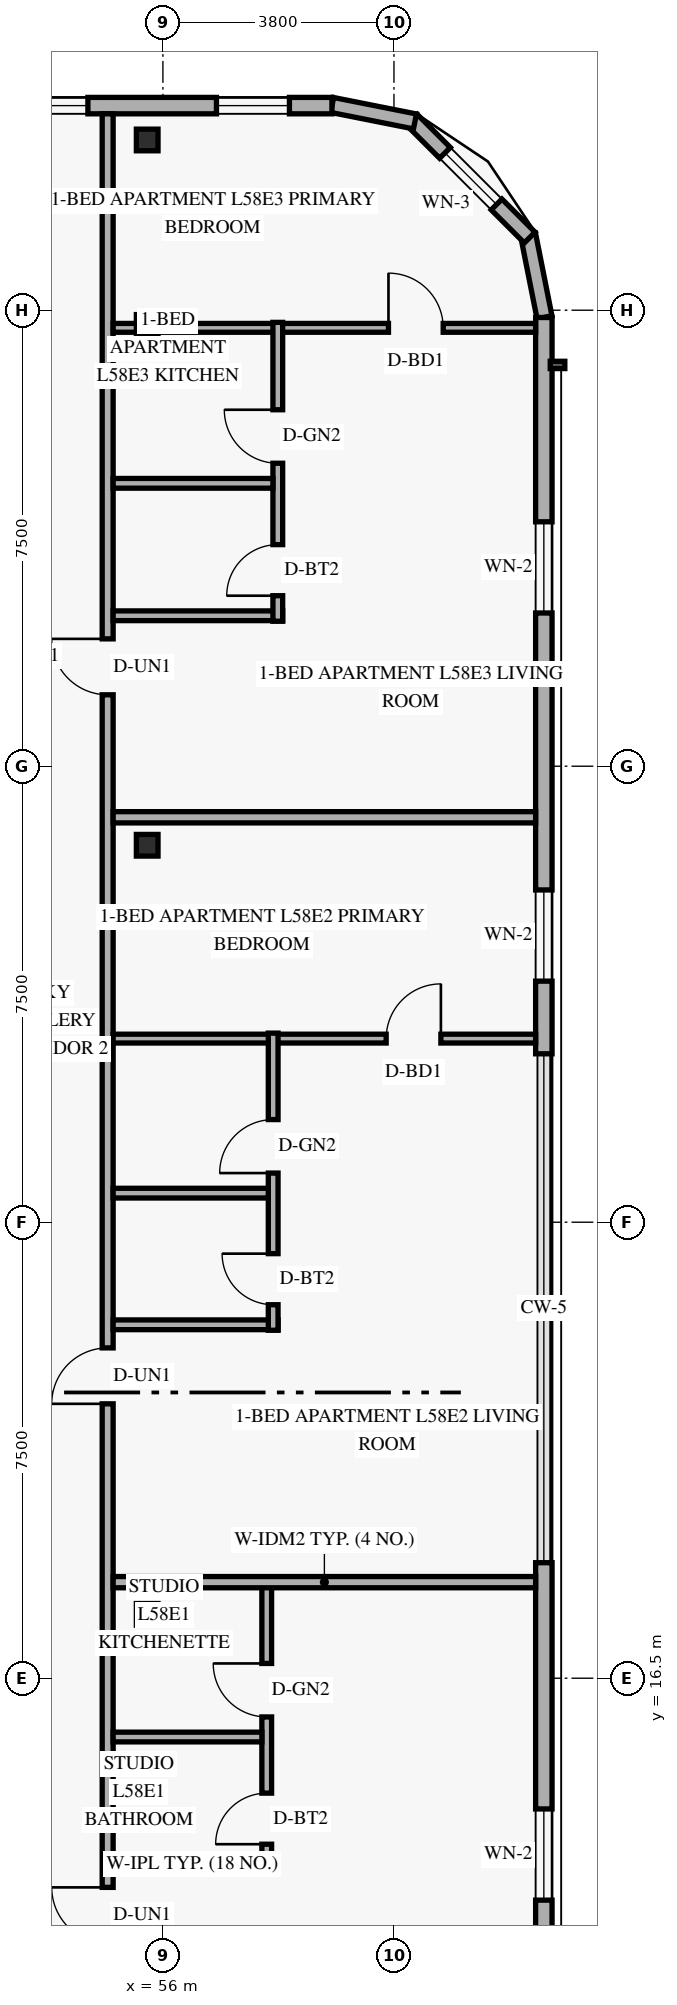
"""IFC4 building model, lengths in metres.
Left out: names, types, materials, properties, quantities, classifications, styles, units other than length and angle.
Written with IfcOpenShell. Run it as: python <this file> out.ifc"""

import sys

from ifc_helpers import new_model, si_unit, direction, frame, frame_2d, origin, origin_2d, place, context, subcontext, project, spatial, rectangle, hollow_rectangle, extrude, element, fill, save


model = new_model("IFC4")
c1 = context("Model", 3, precision=1e-05, world=origin(), true_north=direction((0.0, 1.0)))
c2 = subcontext(c1, "Body", "Model", "MODEL_VIEW")
j1 = project(units=[si_unit("LENGTHUNIT", "METRE"), si_unit("PLANEANGLEUNIT", "RADIAN")], contexts=[c1])
p1 = place(None, origin())
s1 = spatial("IfcSite", under=j1, at=p1, CompositionType="ELEMENT")
p2 = place(p1, origin())
s2 = spatial("IfcBuilding", under=s1, at=p2, CompositionType="ELEMENT")
p3 = place(p2, frame((0.0, 0.0, 223.8)))
s3 = spatial("IfcBuildingStorey", under=s2, at=p3, CompositionType="ELEMENT", Elevation=223.8)
for number, where, z_axis, x_axis in (
    (1, (55.637, 17.55, 0.0), (0.058, 0.0, 0.998), (0.0, 1.0, 0.0)),
    (2, (55.637, 30.2, 0.0), (0.058, 0.0, 0.998), (0.0, 1.0, 0.0)),
    (3, (55.637, 38.75, 0.0), (0.058, 0.0, 0.998), (0.0, 1.0, 0.0)),
    (4, (55.637, 41.8, 0.0), (0.058, 0.0, 0.998), (0.0, 1.0, 0.0)),
):
    element("IfcColumn", number, at=place(p3, frame(where, z_axis=z_axis, x_axis=x_axis)), inside=s3, PredefinedType="COLUMN", context=c2, shape_type="SweptSolid", body=[
        extrude(hollow_rectangle(XDim=0.356, YDim=0.356, WallThickness=0.016, at=origin_2d()), origin(), (0.0, 0.0, 1.0), 3.606),
    ])
p4 = place(p3, frame((62.276, 38.884, 0.0), z_axis=(0.0, 0.0, 1.0), x_axis=(-0.195135625965, 0.9807762678, 0.0)))
e5 = element("IfcWall", 5, at=p4, inside=s3, PredefinedType="SOLIDWALL", context=c2, shape_type="SweptSolid", body=[
    extrude(rectangle(XDim=1.389, YDim=0.25, at=frame_2d((0.694, 0.0))), origin(), (0.0, 0.0, 1.0), 3.36),
])
p5 = place(p3, frame((62.032, 40.195, 0.0), z_axis=(0.0, 0.0, 1.0), x_axis=(-0.707106781187, 0.707106781187, 0.0)))
e6 = element("IfcWall", 6, at=p5, inside=s3, PredefinedType="SOLIDWALL", context=c2, shape_type="SweptSolid", body=[
    extrude(rectangle(XDim=2.739, YDim=0.25, at=frame_2d((1.37, 0.0))), origin(), (0.0, 0.0, 1.0), 3.36),
])
p6 = place(p5, frame((0.77, 0.0, 0.85)))
e7 = element("IfcOpeningElement", 7, at=p6, cuts=e6, PredefinedType="OPENING", context=c2, shape_type="SweptSolid", body=[
    extrude(rectangle(XDim=1.2, YDim=1.5, at=frame_2d((0.6, 0.75))), frame((0.0, 0.135, 0.0), z_axis=(0.0, -1.0, 0.0), x_axis=(1.0, 0.0, 0.0)), (0.0, 0.0, 1.0), 0.27),
])
p7 = place(p3, frame((60.146, 42.105, 0.0), z_axis=(0.0, 0.0, 1.0), x_axis=(-0.980809899341, 0.19496651342, 0.0)))
e8 = element("IfcWall", 8, at=p7, inside=s3, PredefinedType="SOLIDWALL", context=c2, shape_type="SweptSolid", body=[
    extrude(rectangle(XDim=1.389, YDim=0.25, at=frame_2d((0.694, 0.0))), origin(), (0.0, 0.0, 1.0), 3.36),
])
p8 = place(p3, frame((62.265, 9.12, 0.0), z_axis=(0.0, 0.0, 1.0), x_axis=(0.0, 1.0, 0.0)))
e9 = element("IfcWall", 9, at=p8, inside=s3, PredefinedType="SOLIDWALL", context=c2, shape_type="SweptSolid", body=[
    extrude(rectangle(XDim=9.28, YDim=0.27, at=frame_2d((4.64, 0.0))), origin(), (0.0, 0.0, 1.0), 3.36),
])
p9 = place(p8, frame((3.73, 0.0, 0.85)))
e10 = element("IfcOpeningElement", 10, at=p9, cuts=e9, PredefinedType="OPENING", context=c2, shape_type="SweptSolid", body=[
    extrude(rectangle(XDim=1.5, YDim=1.55, at=frame_2d((0.75, 0.775))), frame((0.0, 0.145, 0.0), z_axis=(0.0, -1.0, 0.0), x_axis=(1.0, 0.0, 0.0)), (0.0, 0.0, 1.0), 0.29),
])
p10 = place(p3, frame((62.265, 26.77, 0.0), z_axis=(0.0, 0.0, 1.0), x_axis=(0.0, 1.0, 0.0)))
e11 = element("IfcWall", 11, at=p10, inside=s3, PredefinedType="SOLIDWALL", context=c2, shape_type="SweptSolid", body=[
    extrude(rectangle(XDim=12.11, YDim=0.27, at=frame_2d((6.055, 0.0))), origin(), (0.0, 0.0, 1.0), 3.36),
])
p11 = place(p10, frame((1.195, 0.0, 0.85)))
e12 = element("IfcOpeningElement", 12, at=p11, cuts=e11, PredefinedType="OPENING", context=c2, shape_type="SweptSolid", body=[
    extrude(rectangle(XDim=1.5, YDim=1.55, at=frame_2d((0.75, 0.775))), frame((0.0, 0.145, 0.0), z_axis=(0.0, -1.0, 0.0), x_axis=(1.0, 0.0, 0.0)), (0.0, 0.0, 1.0), 0.29),
])
p12 = place(p10, frame((7.25, 0.0, 0.85)))
e13 = element("IfcOpeningElement", 13, at=p12, cuts=e11, PredefinedType="OPENING", context=c2, shape_type="SweptSolid", body=[
    extrude(rectangle(XDim=1.5, YDim=1.55, at=frame_2d((0.75, 0.775))), frame((0.0, 0.145, 0.0), z_axis=(0.0, -1.0, 0.0), x_axis=(1.0, 0.0, 0.0)), (0.0, 0.0, 1.0), 0.29),
])
p13 = place(p3, frame((58.78, 42.365, 0.0), z_axis=(0.0, 0.0, 1.0), x_axis=(-1.0, 0.0, 0.0)))
e14 = element("IfcWall", 14, at=p13, inside=s3, PredefinedType="SOLIDWALL", context=c2, shape_type="SweptSolid", body=[
    extrude(rectangle(XDim=32.96, YDim=0.27, at=frame_2d((16.48, 0.0))), origin(), (0.0, 0.0, 1.0), 3.36),
])
p14 = place(p13, frame((27.89, 0.0, 0.85)))
e15 = element("IfcOpeningElement", 15, at=p14, cuts=e14, PredefinedType="OPENING", context=c2, shape_type="SweptSolid", body=[
    extrude(rectangle(XDim=1.2, YDim=1.5, at=frame_2d((0.6, 0.75))), frame((0.0, 0.145, 0.0), z_axis=(0.0, -1.0, 0.0), x_axis=(1.0, 0.0, 0.0)), (0.0, 0.0, 1.0), 0.29),
])
p15 = place(p13, frame((15.034, 0.0, 0.85)))
e16 = element("IfcOpeningElement", 16, at=p15, cuts=e14, PredefinedType="OPENING", context=c2, shape_type="SweptSolid", body=[
    extrude(rectangle(XDim=1.2, YDim=1.5, at=frame_2d((0.6, 0.75))), frame((0.0, 0.145, 0.0), z_axis=(0.0, -1.0, 0.0), x_axis=(1.0, 0.0, 0.0)), (0.0, 0.0, 1.0), 0.29),
])
p16 = place(p13, frame((4.013, 0.0, 0.85)))
e17 = element("IfcOpeningElement", 17, at=p16, cuts=e14, PredefinedType="OPENING", context=c2, shape_type="SweptSolid", body=[
    extrude(rectangle(XDim=1.2, YDim=1.5, at=frame_2d((0.6, 0.75))), frame((0.0, 0.145, 0.0), z_axis=(0.0, -1.0, 0.0), x_axis=(1.0, 0.0, 0.0)), (0.0, 0.0, 1.0), 0.29),
])
p17 = place(p13, frame((0.699, 0.0, 0.85)))
e18 = element("IfcOpeningElement", 18, at=p17, cuts=e14, PredefinedType="OPENING", context=c2, shape_type="SweptSolid", body=[
    extrude(rectangle(XDim=1.2, YDim=1.5, at=frame_2d((0.6, 0.75))), frame((0.0, 0.145, 0.0), z_axis=(0.0, -1.0, 0.0), x_axis=(1.0, 0.0, 0.0)), (0.0, 0.0, 1.0), 0.29),
])
p18 = place(p3, frame((55.092, 5.77, 0.0), z_axis=(0.0, 0.0, 1.0), x_axis=(0.0, 1.0, 0.0)))
e19 = element("IfcWall", 19, at=p18, inside=s3, PredefinedType="STANDARD", context=c2, shape_type="SweptSolid", body=[
    extrude(rectangle(XDim=36.46, YDim=0.18, at=frame_2d((18.23, 0.0))), origin(), (0.0, 0.0, 1.0), 2.803),
])
p19 = place(p18, frame((6.37, 0.0, 0.0)))
e20 = element("IfcOpeningElement", 20, at=p19, cuts=e19, PredefinedType="OPENING", context=c2, shape_type="SweptSolid", body=[
    extrude(rectangle(XDim=0.92, YDim=2.15, at=frame_2d((0.46, 1.075))), frame((0.0, 0.1, 0.0), z_axis=(0.0, -1.0, 0.0), x_axis=(1.0, 0.0, 0.0)), (0.0, 0.0, 1.0), 0.2),
])
p20 = place(p18, frame((15.243, 0.0, 0.0)))
e21 = element("IfcOpeningElement", 21, at=p20, cuts=e19, PredefinedType="OPENING", context=c2, shape_type="SweptSolid", body=[
    extrude(rectangle(XDim=0.92, YDim=2.15, at=frame_2d((0.46, 1.075))), frame((0.0, 0.1, 0.0), z_axis=(0.0, -1.0, 0.0), x_axis=(1.0, 0.0, 0.0)), (0.0, 0.0, 1.0), 0.2),
])
p21 = place(p18, frame((26.905, 0.0, 0.0)))
e22 = element("IfcOpeningElement", 22, at=p21, cuts=e19, PredefinedType="OPENING", context=c2, shape_type="SweptSolid", body=[
    extrude(rectangle(XDim=0.92, YDim=2.15, at=frame_2d((0.46, 1.075))), frame((0.0, 0.1, 0.0), z_axis=(0.0, -1.0, 0.0), x_axis=(1.0, 0.0, 0.0)), (0.0, 0.0, 1.0), 0.2),
])
p22 = place(p3, frame((55.182, 13.44, 0.0), z_axis=(0.0, 0.0, 1.0), x_axis=(1.0, 0.0, 0.0)))
e23 = element("IfcWall", 23, at=p22, inside=s3, PredefinedType="PLUMBINGWALL", context=c2, shape_type="SweptSolid", body=[
    extrude(rectangle(XDim=2.606, YDim=0.16, at=frame_2d((1.303, 0.0))), origin(), (0.0, 0.0, 1.0), 2.803),
])
p23 = place(p3, frame((57.708, 13.35, 0.0), z_axis=(0.0, 0.0, 1.0), x_axis=(0.0, 1.0, 0.0)))
e24 = element("IfcWall", 24, at=p23, inside=s3, PredefinedType="PLUMBINGWALL", context=c2, shape_type="SweptSolid", body=[
    extrude(rectangle(XDim=4.73, YDim=0.16, at=frame_2d((2.365, 0.0))), origin(), (0.0, 0.0, 1.0), 3.36),
])
p24 = place(p23, frame((0.42, 0.0, 0.0)))
e25 = element("IfcOpeningElement", 25, at=p24, cuts=e24, PredefinedType="OPENING", context=c2, shape_type="SweptSolid", body=[
    extrude(rectangle(XDim=0.84, YDim=2.12, at=frame_2d((0.42, 1.06))), frame((0.0, 0.09, 0.0), z_axis=(0.0, -1.0, 0.0), x_axis=(1.0, 0.0, 0.0)), (0.0, 0.0, 1.0), 0.18),
])
p25 = place(p23, frame((2.513, 0.0, 0.0)))
e26 = element("IfcOpeningElement", 26, at=p25, cuts=e24, PredefinedType="OPENING", context=c2, shape_type="SweptSolid", body=[
    extrude(rectangle(XDim=0.88, YDim=2.12, at=frame_2d((0.44, 1.06))), frame((0.0, 0.09, 0.0), z_axis=(0.0, -1.0, 0.0), x_axis=(1.0, 0.0, 0.0)), (0.0, 0.0, 1.0), 0.18),
])
p26 = place(p3, frame((55.182, 15.533, 0.0), z_axis=(0.0, 0.0, 1.0), x_axis=(1.0, 0.0, 0.0)))
e27 = element("IfcWall", 27, at=p26, inside=s3, PredefinedType="PLUMBINGWALL", context=c2, shape_type="SweptSolid", body=[
    extrude(rectangle(XDim=2.446, YDim=0.16, at=frame_2d((1.223, 0.0))), origin(), (0.0, 0.0, 1.0), 2.803),
])
p27 = place(p3, frame((55.182, 18.08, 0.0), z_axis=(0.0, 0.0, 1.0), x_axis=(1.0, 0.0, 0.0)))
e28 = element("IfcWall", 28, at=p27, inside=s3, PredefinedType="PARTITIONING", context=c2, shape_type="SweptSolid", body=[
    extrude(rectangle(XDim=6.948, YDim=0.185, at=frame_2d((3.474, 0.0))), origin(), (0.0, 0.0, 1.0), 2.803),
])
p28 = place(p3, frame((55.182, 27.02, 0.0), z_axis=(0.0, 0.0, 1.0), x_axis=(1.0, 0.0, 0.0)))
e29 = element("IfcWall", 29, at=p28, inside=s3, PredefinedType="PARTITIONING", context=c2, shape_type="SweptSolid", body=[
    extrude(rectangle(XDim=6.948, YDim=0.145, at=frame_2d((3.474, 0.0))), origin(), (0.0, 0.0, 1.0), 2.803),
])
p29 = place(p28, frame((4.49, 0.0, 0.0)))
e30 = element("IfcOpeningElement", 30, at=p29, cuts=e29, PredefinedType="OPENING", context=c2, shape_type="SweptSolid", body=[
    extrude(rectangle(XDim=0.9, YDim=2.14, at=frame_2d((0.45, 1.07))), frame((0.0, 0.083, 0.0), z_axis=(0.0, -1.0, 0.0), x_axis=(1.0, 0.0, 0.0)), (0.0, 0.0, 1.0), 0.165),
])
p30 = place(p3, frame((55.182, 22.313, 0.0), z_axis=(0.0, 0.0, 1.0), x_axis=(1.0, 0.0, 0.0)))
e31 = element("IfcWall", 31, at=p30, inside=s3, PredefinedType="PLUMBINGWALL", context=c2, shape_type="SweptSolid", body=[
    extrude(rectangle(XDim=2.712, YDim=0.16, at=frame_2d((1.356, 0.0))), origin(), (0.0, 0.0, 1.0), 2.803),
])
p31 = place(p3, frame((57.814, 22.223, 0.0), z_axis=(0.0, 0.0, 1.0), x_axis=(0.0, 1.0, 0.0)))
e32 = element("IfcWall", 32, at=p31, inside=s3, PredefinedType="PLUMBINGWALL", context=c2, shape_type="SweptSolid", body=[
    extrude(rectangle(XDim=4.887, YDim=0.16, at=frame_2d((2.444, 0.0))), origin(), (0.0, 0.0, 1.0), 3.36),
])
p32 = place(p31, frame((0.42, 0.0, 0.0)))
e33 = element("IfcOpeningElement", 33, at=p32, cuts=e32, PredefinedType="OPENING", context=c2, shape_type="SweptSolid", body=[
    extrude(rectangle(XDim=0.84, YDim=2.12, at=frame_2d((0.42, 1.06))), frame((0.0, 0.09, 0.0), z_axis=(0.0, -1.0, 0.0), x_axis=(1.0, 0.0, 0.0)), (0.0, 0.0, 1.0), 0.18),
])
p33 = place(p31, frame((2.585, 0.0, 0.0)))
e34 = element("IfcOpeningElement", 34, at=p33, cuts=e32, PredefinedType="OPENING", context=c2, shape_type="SweptSolid", body=[
    extrude(rectangle(XDim=0.88, YDim=2.12, at=frame_2d((0.44, 1.06))), frame((0.0, 0.09, 0.0), z_axis=(0.0, -1.0, 0.0), x_axis=(1.0, 0.0, 0.0)), (0.0, 0.0, 1.0), 0.18),
])
p34 = place(p3, frame((55.182, 24.478, 0.0), z_axis=(0.0, 0.0, 1.0), x_axis=(1.0, 0.0, 0.0)))
e35 = element("IfcWall", 35, at=p34, inside=s3, PredefinedType="PLUMBINGWALL", context=c2, shape_type="SweptSolid", body=[
    extrude(rectangle(XDim=2.552, YDim=0.16, at=frame_2d((1.276, 0.0))), origin(), (0.0, 0.0, 1.0), 2.803),
])
p35 = place(p3, frame((55.182, 30.66, 0.0), z_axis=(0.0, 0.0, 1.0), x_axis=(1.0, 0.0, 0.0)))
e36 = element("IfcWall", 36, at=p35, inside=s3, PredefinedType="PARTITIONING", context=c2, shape_type="SweptSolid", body=[
    extrude(rectangle(XDim=6.948, YDim=0.185, at=frame_2d((3.474, 0.0))), origin(), (0.0, 0.0, 1.0), 2.803),
])
p36 = place(p3, frame((55.182, 38.71, 0.0), z_axis=(0.0, 0.0, 1.0), x_axis=(1.0, 0.0, 0.0)))
e37 = element("IfcWall", 37, at=p36, inside=s3, PredefinedType="PARTITIONING", context=c2, shape_type="SweptSolid", body=[
    extrude(rectangle(XDim=6.948, YDim=0.145, at=frame_2d((3.474, 0.0))), origin(), (0.0, 0.0, 1.0), 2.803),
])
p37 = place(p36, frame((4.528, 0.0, 0.0)))
e38 = element("IfcOpeningElement", 38, at=p37, cuts=e37, PredefinedType="OPENING", context=c2, shape_type="SweptSolid", body=[
    extrude(rectangle(XDim=0.9, YDim=2.14, at=frame_2d((0.45, 1.07))), frame((0.0, 0.083, 0.0), z_axis=(0.0, -1.0, 0.0), x_axis=(1.0, 0.0, 0.0)), (0.0, 0.0, 1.0), 0.165),
])
p38 = place(p3, frame((55.182, 33.975, 0.0), z_axis=(0.0, 0.0, 1.0), x_axis=(1.0, 0.0, 0.0)))
e39 = element("IfcWall", 39, at=p38, inside=s3, PredefinedType="PLUMBINGWALL", context=c2, shape_type="SweptSolid", body=[
    extrude(rectangle(XDim=2.788, YDim=0.16, at=frame_2d((1.394, 0.0))), origin(), (0.0, 0.0, 1.0), 2.803),
])
p39 = place(p3, frame((57.89, 33.885, 0.0), z_axis=(0.0, 0.0, 1.0), x_axis=(0.0, 1.0, 0.0)))
e40 = element("IfcWall", 40, at=p39, inside=s3, PredefinedType="PLUMBINGWALL", context=c2, shape_type="SweptSolid", body=[
    extrude(rectangle(XDim=4.916, YDim=0.16, at=frame_2d((2.458, 0.0))), origin(), (0.0, 0.0, 1.0), 3.36),
])
p40 = place(p39, frame((0.42, 0.0, 0.0)))
e41 = element("IfcOpeningElement", 41, at=p40, cuts=e40, PredefinedType="OPENING", context=c2, shape_type="SweptSolid", body=[
    extrude(rectangle(XDim=0.84, YDim=2.12, at=frame_2d((0.42, 1.06))), frame((0.0, 0.09, 0.0), z_axis=(0.0, -1.0, 0.0), x_axis=(1.0, 0.0, 0.0)), (0.0, 0.0, 1.0), 0.18),
])
p41 = place(p39, frame((2.598, 0.0, 0.0)))
e42 = element("IfcOpeningElement", 42, at=p41, cuts=e40, PredefinedType="OPENING", context=c2, shape_type="SweptSolid", body=[
    extrude(rectangle(XDim=0.88, YDim=2.12, at=frame_2d((0.44, 1.06))), frame((0.0, 0.09, 0.0), z_axis=(0.0, -1.0, 0.0), x_axis=(1.0, 0.0, 0.0)), (0.0, 0.0, 1.0), 0.18),
])
p42 = place(p3, frame((55.182, 36.153, 0.0), z_axis=(0.0, 0.0, 1.0), x_axis=(1.0, 0.0, 0.0)))
e43 = element("IfcWall", 43, at=p42, inside=s3, PredefinedType="PLUMBINGWALL", context=c2, shape_type="SweptSolid", body=[
    extrude(rectangle(XDim=2.628, YDim=0.16, at=frame_2d((1.314, 0.0))), origin(), (0.0, 0.0, 1.0), 2.803),
])
p43 = place(p6, origin())
e44 = element("IfcWindow", 44, at=p43, inside=s3, PartitioningType="SINGLE_PANEL", PredefinedType="WINDOW", context=c2, shape_type="SweptSolid", body=[
    extrude(rectangle(XDim=1.2, YDim=1.5, at=frame_2d((0.6, 0.75))), frame((0.0, 0.03, 0.0), z_axis=(0.0, -1.0, 0.0), x_axis=(1.0, 0.0, 0.0)), (0.0, 0.0, 1.0), 0.06),
])
fill(e7, e44)
p44 = place(p9, origin())
e45 = element("IfcWindow", 45, at=p44, inside=s3, PartitioningType="SINGLE_PANEL", PredefinedType="WINDOW", context=c2, shape_type="SweptSolid", body=[
    extrude(rectangle(XDim=1.5, YDim=1.55, at=frame_2d((0.75, 0.775))), frame((0.0, 0.03, 0.0), z_axis=(0.0, -1.0, 0.0), x_axis=(1.0, 0.0, 0.0)), (0.0, 0.0, 1.0), 0.06),
])
fill(e10, e45)
p45 = place(p11, origin())
e46 = element("IfcWindow", 46, at=p45, inside=s3, PartitioningType="SINGLE_PANEL", PredefinedType="WINDOW", context=c2, shape_type="SweptSolid", body=[
    extrude(rectangle(XDim=1.5, YDim=1.55, at=frame_2d((0.75, 0.775))), frame((0.0, 0.03, 0.0), z_axis=(0.0, -1.0, 0.0), x_axis=(1.0, 0.0, 0.0)), (0.0, 0.0, 1.0), 0.06),
])
fill(e12, e46)
p46 = place(p12, origin())
e47 = element("IfcWindow", 47, at=p46, inside=s3, PartitioningType="SINGLE_PANEL", PredefinedType="WINDOW", context=c2, shape_type="SweptSolid", body=[
    extrude(rectangle(XDim=1.5, YDim=1.55, at=frame_2d((0.75, 0.775))), frame((0.0, 0.03, 0.0), z_axis=(0.0, -1.0, 0.0), x_axis=(1.0, 0.0, 0.0)), (0.0, 0.0, 1.0), 0.06),
])
fill(e13, e47)
p47 = place(p16, origin())
e48 = element("IfcWindow", 48, at=p47, inside=s3, PartitioningType="SINGLE_PANEL", PredefinedType="WINDOW", context=c2, shape_type="SweptSolid", body=[
    extrude(rectangle(XDim=1.2, YDim=1.5, at=frame_2d((0.6, 0.75))), frame((0.0, 0.03, 0.0), z_axis=(0.0, -1.0, 0.0), x_axis=(1.0, 0.0, 0.0)), (0.0, 0.0, 1.0), 0.06),
])
fill(e17, e48)
p48 = place(p17, origin())
e49 = element("IfcWindow", 49, at=p48, inside=s3, PartitioningType="SINGLE_PANEL", PredefinedType="WINDOW", context=c2, shape_type="SweptSolid", body=[
    extrude(rectangle(XDim=1.2, YDim=1.5, at=frame_2d((0.6, 0.75))), frame((0.0, 0.03, 0.0), z_axis=(0.0, -1.0, 0.0), x_axis=(1.0, 0.0, 0.0)), (0.0, 0.0, 1.0), 0.06),
])
fill(e18, e49)
p49 = place(p19, origin())
e50 = element("IfcDoor", 50, at=p49, inside=s3, OperationType="SINGLE_SWING_RIGHT", PredefinedType="DOOR", context=c2, shape_type="SweptSolid", body=[
    extrude(rectangle(XDim=0.92, YDim=2.15, at=frame_2d((0.46, 1.075))), frame((0.0, 0.025, 0.0), z_axis=(0.0, -1.0, 0.0), x_axis=(1.0, 0.0, 0.0)), (0.0, 0.0, 1.0), 0.05),
])
fill(e20, e50)
p50 = place(p24, origin())
e51 = element("IfcDoor", 51, at=p50, inside=s3, OperationType="SINGLE_SWING_LEFT", PredefinedType="DOOR", context=c2, shape_type="SweptSolid", body=[
    extrude(rectangle(XDim=0.84, YDim=2.12, at=frame_2d((0.42, 1.06))), frame((0.0, 0.025, 0.0), z_axis=(0.0, -1.0, 0.0), x_axis=(1.0, 0.0, 0.0)), (0.0, 0.0, 1.0), 0.05),
])
fill(e25, e51)
p51 = place(p25, origin())
e52 = element("IfcDoor", 52, at=p51, inside=s3, OperationType="SINGLE_SWING_RIGHT", PredefinedType="DOOR", context=c2, shape_type="SweptSolid", body=[
    extrude(rectangle(XDim=0.88, YDim=2.12, at=frame_2d((0.44, 1.06))), frame((0.0, 0.025, 0.0), z_axis=(0.0, -1.0, 0.0), x_axis=(1.0, 0.0, 0.0)), (0.0, 0.0, 1.0), 0.05),
])
fill(e26, e52)
p52 = place(p20, origin())
e53 = element("IfcDoor", 53, at=p52, inside=s3, OperationType="SINGLE_SWING_LEFT", PredefinedType="DOOR", context=c2, shape_type="SweptSolid", body=[
    extrude(rectangle(XDim=0.92, YDim=2.15, at=frame_2d((0.46, 1.075))), frame((0.0, 0.025, 0.0), z_axis=(0.0, -1.0, 0.0), x_axis=(1.0, 0.0, 0.0)), (0.0, 0.0, 1.0), 0.05),
])
fill(e21, e53)
p53 = place(p32, origin())
e54 = element("IfcDoor", 54, at=p53, inside=s3, OperationType="SINGLE_SWING_RIGHT", PredefinedType="DOOR", context=c2, shape_type="SweptSolid", body=[
    extrude(rectangle(XDim=0.84, YDim=2.12, at=frame_2d((0.42, 1.06))), frame((0.0, 0.025, 0.0), z_axis=(0.0, -1.0, 0.0), x_axis=(1.0, 0.0, 0.0)), (0.0, 0.0, 1.0), 0.05),
])
fill(e33, e54)
p54 = place(p33, origin())
e55 = element("IfcDoor", 55, at=p54, inside=s3, OperationType="SINGLE_SWING_LEFT", PredefinedType="DOOR", context=c2, shape_type="SweptSolid", body=[
    extrude(rectangle(XDim=0.88, YDim=2.12, at=frame_2d((0.44, 1.06))), frame((0.0, 0.025, 0.0), z_axis=(0.0, -1.0, 0.0), x_axis=(1.0, 0.0, 0.0)), (0.0, 0.0, 1.0), 0.05),
])
fill(e34, e55)
p55 = place(p29, origin())
e56 = element("IfcDoor", 56, at=p55, inside=s3, OperationType="SINGLE_SWING_RIGHT", PredefinedType="DOOR", context=c2, shape_type="SweptSolid", body=[
    extrude(rectangle(XDim=0.9, YDim=2.14, at=frame_2d((0.45, 1.07))), frame((0.0, 0.025, 0.0), z_axis=(0.0, -1.0, 0.0), x_axis=(1.0, 0.0, 0.0)), (0.0, 0.0, 1.0), 0.05),
])
fill(e30, e56)
p56 = place(p21, origin())
e57 = element("IfcDoor", 57, at=p56, inside=s3, OperationType="SINGLE_SWING_RIGHT", PredefinedType="DOOR", context=c2, shape_type="SweptSolid", body=[
    extrude(rectangle(XDim=0.92, YDim=2.15, at=frame_2d((0.46, 1.075))), frame((0.0, 0.025, 0.0), z_axis=(0.0, -1.0, 0.0), x_axis=(1.0, 0.0, 0.0)), (0.0, 0.0, 1.0), 0.05),
])
fill(e22, e57)
p57 = place(p40, origin())
e58 = element("IfcDoor", 58, at=p57, inside=s3, OperationType="SINGLE_SWING_LEFT", PredefinedType="DOOR", context=c2, shape_type="SweptSolid", body=[
    extrude(rectangle(XDim=0.84, YDim=2.12, at=frame_2d((0.42, 1.06))), frame((0.0, 0.025, 0.0), z_axis=(0.0, -1.0, 0.0), x_axis=(1.0, 0.0, 0.0)), (0.0, 0.0, 1.0), 0.05),
])
fill(e41, e58)
p58 = place(p41, origin())
e59 = element("IfcDoor", 59, at=p58, inside=s3, OperationType="SINGLE_SWING_RIGHT", PredefinedType="DOOR", context=c2, shape_type="SweptSolid", body=[
    extrude(rectangle(XDim=0.88, YDim=2.12, at=frame_2d((0.44, 1.06))), frame((0.0, 0.025, 0.0), z_axis=(0.0, -1.0, 0.0), x_axis=(1.0, 0.0, 0.0)), (0.0, 0.0, 1.0), 0.05),
])
fill(e42, e59)
p59 = place(p37, origin())
e60 = element("IfcDoor", 60, at=p59, inside=s3, OperationType="SINGLE_SWING_LEFT", PredefinedType="DOOR", context=c2, shape_type="SweptSolid", body=[
    extrude(rectangle(XDim=0.9, YDim=2.14, at=frame_2d((0.45, 1.07))), frame((0.0, 0.025, 0.0), z_axis=(0.0, -1.0, 0.0), x_axis=(1.0, 0.0, 0.0)), (0.0, 0.0, 1.0), 0.05),
])
fill(e38, e60)
save(model, sys.argv[1])
